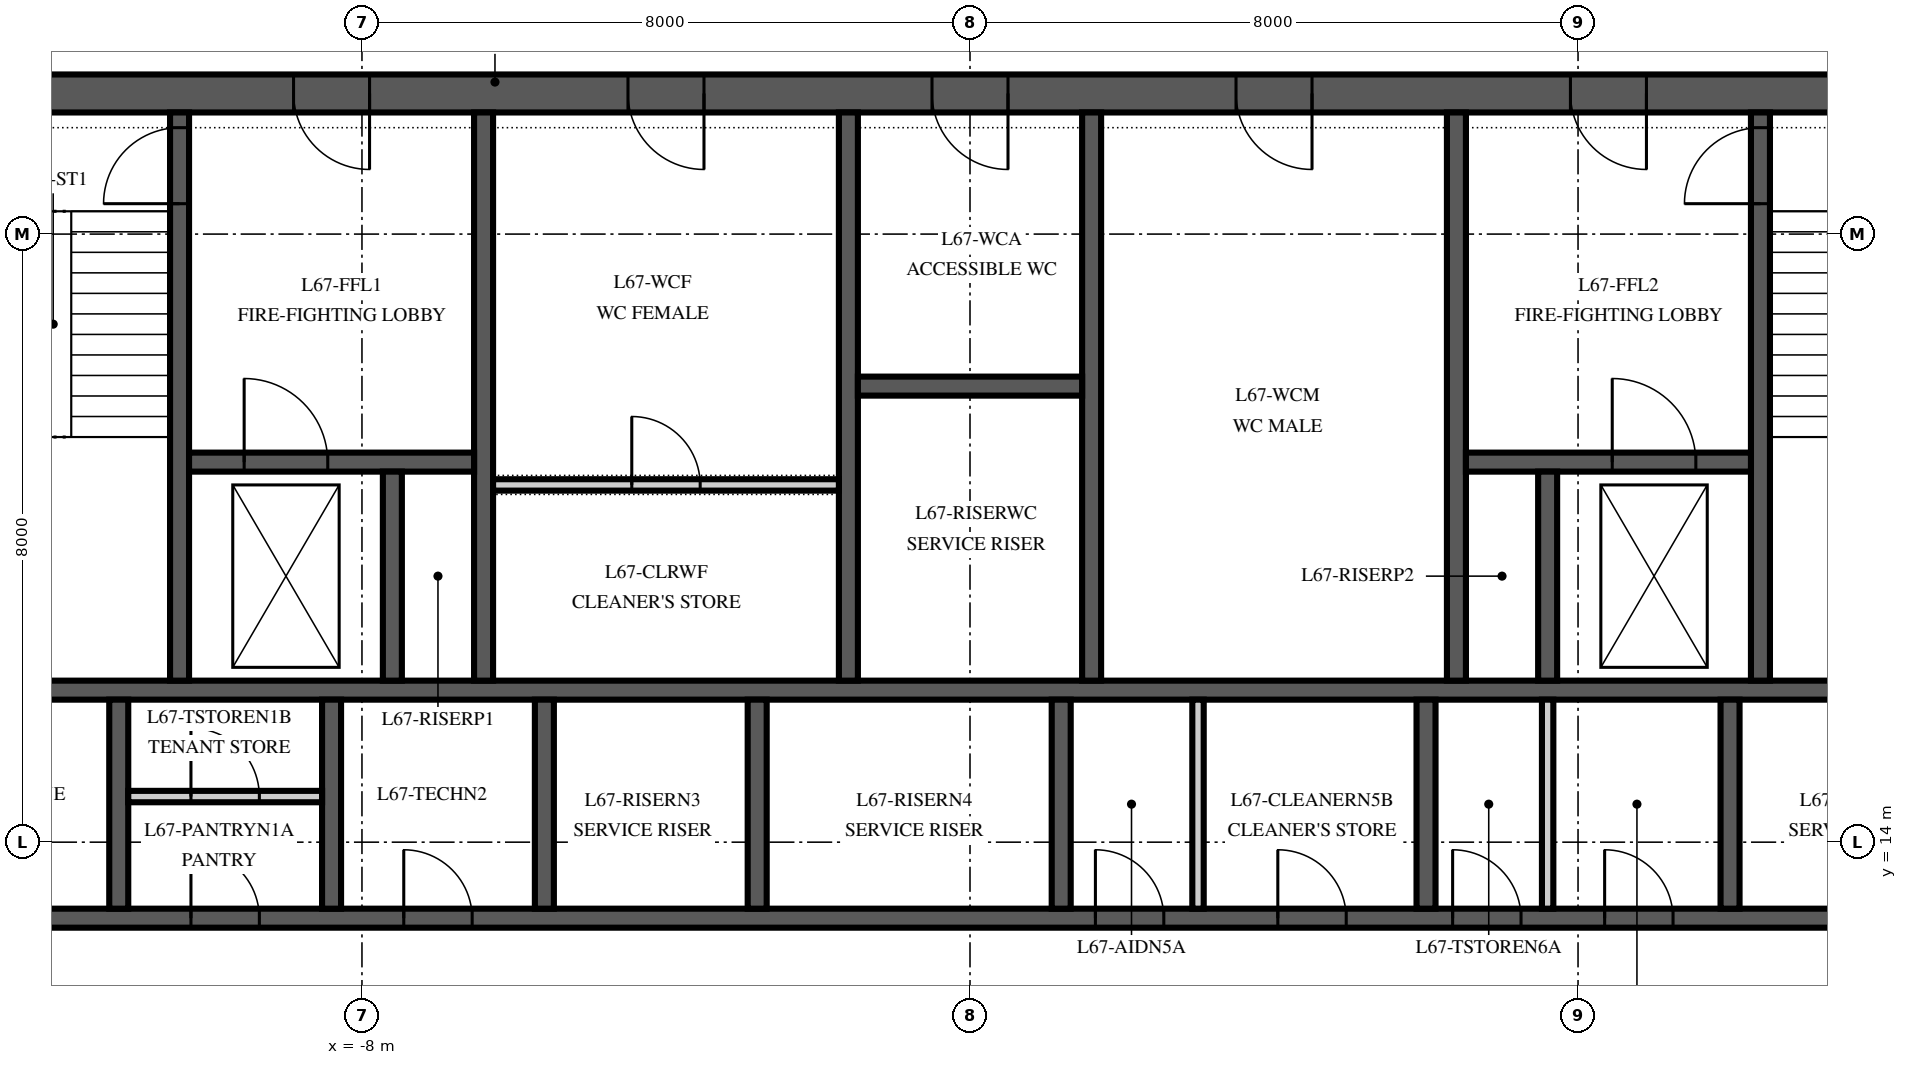
"""IFC4 building model, lengths in metres.
Left out: names, types, materials, properties, quantities, classifications, styles, units other than length and angle.
Written with IfcOpenShell. Run it as: python <this file> out.ifc"""

import sys

from ifc_helpers import new_model, si_unit, direction, frame, frame_2d, origin, place, context, subcontext, project, spatial, rectangle, extrude, element, fill, save


model = new_model("IFC4")
c1 = context("Model", 3, precision=1e-05, world=origin(), true_north=direction((0.0, 1.0)))
c2 = subcontext(c1, "Body", "Model", "MODEL_VIEW")
j1 = project(units=[si_unit("LENGTHUNIT", "METRE"), si_unit("PLANEANGLEUNIT", "RADIAN")], contexts=[c1])
p1 = place(None, origin())
s1 = spatial("IfcSite", under=j1, at=p1, CompositionType="ELEMENT")
p2 = place(p1, origin())
s2 = spatial("IfcBuilding", under=s1, at=p2, CompositionType="ELEMENT")
p3 = place(p2, frame((0.0, 0.0, 288.0)))
s3 = spatial("IfcBuildingStorey", under=s2, at=p3, CompositionType="ELEMENT", Elevation=288.0)
p4 = place(p3, frame((13.85, 23.85, 0.0), z_axis=(0.0, 0.0, 1.0), x_axis=(-1.0, 0.0, 0.0)))
e1 = element("IfcWall", 1, at=p4, inside=s3, PredefinedType="SHEAR", context=c2, shape_type="SweptSolid", body=[
    extrude(rectangle(XDim=27.7, YDim=0.5, at=frame_2d((13.85, 0.0))), origin(), (0.0, 0.0, 1.0), 4.0),
])
p5 = place(p4, frame((21.75, 0.0, 0.0)))
e2 = element("IfcOpeningElement", 2, at=p5, cuts=e1, PredefinedType="OPENING", context=c2, shape_type="SweptSolid", body=[
    extrude(rectangle(XDim=1.0, YDim=2.1, at=frame_2d((0.5, 1.05))), frame((0.0, 0.265, 0.0), z_axis=(0.0, -1.0, 0.0), x_axis=(1.0, 0.0, 0.0)), (0.0, 0.0, 1.0), 0.53),
])
p6 = place(p4, frame((4.95, 0.0, 0.0)))
e3 = element("IfcOpeningElement", 3, at=p6, cuts=e1, PredefinedType="OPENING", context=c2, shape_type="SweptSolid", body=[
    extrude(rectangle(XDim=1.0, YDim=2.1, at=frame_2d((0.5, 1.05))), frame((0.0, 0.265, 0.0), z_axis=(0.0, -1.0, 0.0), x_axis=(1.0, 0.0, 0.0)), (0.0, 0.0, 1.0), 0.53),
])
p7 = place(p4, frame((17.35, 0.0, 0.0)))
e4 = element("IfcOpeningElement", 4, at=p7, cuts=e1, PredefinedType="OPENING", context=c2, shape_type="SweptSolid", body=[
    extrude(rectangle(XDim=1.0, YDim=2.1, at=frame_2d((0.5, 1.05))), frame((0.0, 0.265, 0.0), z_axis=(0.0, -1.0, 0.0), x_axis=(1.0, 0.0, 0.0)), (0.0, 0.0, 1.0), 0.53),
])
p8 = place(p4, frame((13.35, 0.0, 0.0)))
e5 = element("IfcOpeningElement", 5, at=p8, cuts=e1, PredefinedType="OPENING", context=c2, shape_type="SweptSolid", body=[
    extrude(rectangle(XDim=1.0, YDim=2.1, at=frame_2d((0.5, 1.05))), frame((0.0, 0.265, 0.0), z_axis=(0.0, -1.0, 0.0), x_axis=(1.0, 0.0, 0.0)), (0.0, 0.0, 1.0), 0.53),
])
p9 = place(p4, frame((9.35, 0.0, 0.0)))
e6 = element("IfcOpeningElement", 6, at=p9, cuts=e1, PredefinedType="OPENING", context=c2, shape_type="SweptSolid", body=[
    extrude(rectangle(XDim=1.0, YDim=2.1, at=frame_2d((0.5, 1.05))), frame((0.0, 0.265, 0.0), z_axis=(0.0, -1.0, 0.0), x_axis=(1.0, 0.0, 0.0)), (0.0, 0.0, 1.0), 0.53),
])
p10 = place(p3, frame((-13.6, 13.0, 0.0), z_axis=(0.0, 0.0, 1.0), x_axis=(1.0, 0.0, 0.0)))
e7 = element("IfcWall", 7, at=p10, inside=s3, PredefinedType="SHEAR", context=c2, shape_type="SweptSolid", body=[
    extrude(rectangle(XDim=27.2, YDim=0.25, at=frame_2d((13.6, 0.0))), origin(), (0.0, 0.0, 1.0), 4.0),
])
p11 = place(p10, frame((15.25, 0.0, 0.0)))
e8 = element("IfcOpeningElement", 8, at=p11, cuts=e7, PredefinedType="OPENING", context=c2, shape_type="SweptSolid", body=[
    extrude(rectangle(XDim=0.9, YDim=2.1, at=frame_2d((0.45, 1.05))), frame((0.0, 0.14, 0.0), z_axis=(0.0, -1.0, 0.0), x_axis=(1.0, 0.0, 0.0)), (0.0, 0.0, 1.0), 0.28),
])
p12 = place(p10, frame((17.65, 0.0, 0.0)))
e9 = element("IfcOpeningElement", 9, at=p12, cuts=e7, PredefinedType="OPENING", context=c2, shape_type="SweptSolid", body=[
    extrude(rectangle(XDim=0.9, YDim=2.1, at=frame_2d((0.45, 1.05))), frame((0.0, 0.14, 0.0), z_axis=(0.0, -1.0, 0.0), x_axis=(1.0, 0.0, 0.0)), (0.0, 0.0, 1.0), 0.28),
])
p13 = place(p10, frame((19.95, 0.0, 0.0)))
e10 = element("IfcOpeningElement", 10, at=p13, cuts=e7, PredefinedType="OPENING", context=c2, shape_type="SweptSolid", body=[
    extrude(rectangle(XDim=0.9, YDim=2.1, at=frame_2d((0.45, 1.05))), frame((0.0, 0.14, 0.0), z_axis=(0.0, -1.0, 0.0), x_axis=(1.0, 0.0, 0.0)), (0.0, 0.0, 1.0), 0.28),
])
p14 = place(p10, frame((21.95, 0.0, 0.0)))
e11 = element("IfcOpeningElement", 11, at=p14, cuts=e7, PredefinedType="OPENING", context=c2, shape_type="SweptSolid", body=[
    extrude(rectangle(XDim=0.9, YDim=2.1, at=frame_2d((0.45, 1.05))), frame((0.0, 0.14, 0.0), z_axis=(0.0, -1.0, 0.0), x_axis=(1.0, 0.0, 0.0)), (0.0, 0.0, 1.0), 0.28),
])
p15 = place(p10, frame((0.55, 0.0, 0.0)))
e12 = element("IfcOpeningElement", 12, at=p15, cuts=e7, PredefinedType="OPENING", context=c2, shape_type="SweptSolid", body=[
    extrude(rectangle(XDim=0.9, YDim=2.1, at=frame_2d((0.45, 1.05))), frame((0.0, 0.14, 0.0), z_axis=(0.0, -1.0, 0.0), x_axis=(1.0, 0.0, 0.0)), (0.0, 0.0, 1.0), 0.28),
])
p16 = place(p10, frame((3.35, 0.0, 0.0)))
e13 = element("IfcOpeningElement", 13, at=p16, cuts=e7, PredefinedType="OPENING", context=c2, shape_type="SweptSolid", body=[
    extrude(rectangle(XDim=0.9, YDim=2.1, at=frame_2d((0.45, 1.05))), frame((0.0, 0.14, 0.0), z_axis=(0.0, -1.0, 0.0), x_axis=(1.0, 0.0, 0.0)), (0.0, 0.0, 1.0), 0.28),
])
p17 = place(p10, frame((6.15, 0.0, 0.0)))
e14 = element("IfcOpeningElement", 14, at=p17, cuts=e7, PredefinedType="OPENING", context=c2, shape_type="SweptSolid", body=[
    extrude(rectangle(XDim=0.9, YDim=2.1, at=frame_2d((0.45, 1.05))), frame((0.0, 0.14, 0.0), z_axis=(0.0, -1.0, 0.0), x_axis=(1.0, 0.0, 0.0)), (0.0, 0.0, 1.0), 0.28),
])
p18 = place(p3, frame((-13.6, 16.0, 0.0), z_axis=(0.0, 0.0, 1.0), x_axis=(1.0, 0.0, 0.0)))
e15 = element("IfcWall", 15, at=p18, inside=s3, PredefinedType="SHEAR", context=c2, shape_type="SweptSolid", body=[
    extrude(rectangle(XDim=27.2, YDim=0.25, at=frame_2d((13.6, 0.0))), origin(), (0.0, 0.0, 1.0), 4.0),
])
for number, where, z_axis, x_axis in (
    (16, (-11.2, 13.125, 0.0), (0.0, 0.0, 1.0), (0.0, 1.0, 0.0)),
    (17, (-8.4, 13.125, 0.0), (0.0, 0.0, 1.0), (0.0, 1.0, 0.0)),
    (18, (-5.6, 13.125, 0.0), (0.0, 0.0, 1.0), (0.0, 1.0, 0.0)),
    (19, (-2.8, 13.125, 0.0), (0.0, 0.0, 1.0), (0.0, 1.0, 0.0)),
    (20, (1.2, 13.125, 0.0), (0.0, 0.0, 1.0), (0.0, 1.0, 0.0)),
    (21, (6.0, 13.125, 0.0), (0.0, 0.0, 1.0), (0.0, 1.0, 0.0)),
    (22, (10.0, 13.125, 0.0), (0.0, 0.0, 1.0), (0.0, 1.0, 0.0)),
):
    element("IfcWall", number, at=place(p3, frame(where, z_axis=z_axis, x_axis=x_axis)), inside=s3, PredefinedType="SHEAR", context=c2, shape_type="SweptSolid", body=[
        extrude(rectangle(XDim=2.75, YDim=0.25, at=frame_2d((1.375, 0.0))), origin(), (0.0, 0.0, 1.0), 4.0),
    ])
p19 = place(p3, frame((-10.4, 16.125, 0.0), z_axis=(0.0, 0.0, 1.0), x_axis=(0.0, 1.0, 0.0)))
e23 = element("IfcWall", 23, at=p19, inside=s3, PredefinedType="SHEAR", context=c2, shape_type="SweptSolid", body=[
    extrude(rectangle(XDim=7.475, YDim=0.25, at=frame_2d((3.738, 0.0))), origin(), (0.0, 0.0, 1.0), 4.0),
])
p20 = place(p19, frame((6.275, 0.0, 0.0)))
e24 = element("IfcOpeningElement", 24, at=p20, cuts=e23, PredefinedType="OPENING", context=c2, shape_type="SweptSolid", body=[
    extrude(rectangle(XDim=1.0, YDim=2.1, at=frame_2d((0.5, 1.05))), frame((0.0, 0.14, 0.0), z_axis=(0.0, -1.0, 0.0), x_axis=(1.0, 0.0, 0.0)), (0.0, 0.0, 1.0), 0.28),
])
for number, where, z_axis, x_axis in (
    (25, (-6.4, 16.125, 0.0), (0.0, 0.0, 1.0), (0.0, 1.0, 0.0)),
    (26, (-1.6, 16.125, 0.0), (0.0, 0.0, 1.0), (0.0, 1.0, 0.0)),
    (27, (1.6, 16.125, 0.0), (0.0, 0.0, 1.0), (0.0, 1.0, 0.0)),
    (28, (6.4, 16.125, 0.0), (0.0, 0.0, 1.0), (0.0, 1.0, 0.0)),
):
    element("IfcWall", number, at=place(p3, frame(where, z_axis=z_axis, x_axis=x_axis)), inside=s3, PredefinedType="SHEAR", context=c2, shape_type="SweptSolid", body=[
        extrude(rectangle(XDim=7.475, YDim=0.25, at=frame_2d((3.738, 0.0))), origin(), (0.0, 0.0, 1.0), 4.0),
    ])
p21 = place(p3, frame((10.4, 16.125, 0.0), z_axis=(0.0, 0.0, 1.0), x_axis=(0.0, 1.0, 0.0)))
e29 = element("IfcWall", 29, at=p21, inside=s3, PredefinedType="SHEAR", context=c2, shape_type="SweptSolid", body=[
    extrude(rectangle(XDim=7.475, YDim=0.25, at=frame_2d((3.738, 0.0))), origin(), (0.0, 0.0, 1.0), 4.0),
])
p22 = place(p21, frame((6.275, 0.0, 0.0)))
e30 = element("IfcOpeningElement", 30, at=p22, cuts=e29, PredefinedType="OPENING", context=c2, shape_type="SweptSolid", body=[
    extrude(rectangle(XDim=1.0, YDim=2.1, at=frame_2d((0.5, 1.05))), frame((0.0, 0.14, 0.0), z_axis=(0.0, -1.0, 0.0), x_axis=(1.0, 0.0, 0.0)), (0.0, 0.0, 1.0), 0.28),
])
p23 = place(p3, frame((-10.275, 19.0, 0.0), z_axis=(0.0, 0.0, 1.0), x_axis=(1.0, 0.0, 0.0)))
e31 = element("IfcWall", 31, at=p23, inside=s3, PredefinedType="SHEAR", context=c2, shape_type="SweptSolid", body=[
    extrude(rectangle(XDim=3.75, YDim=0.25, at=frame_2d((1.875, 0.0))), origin(), (0.0, 0.0, 1.0), 4.0),
])
p24 = place(p23, frame((0.725, 0.0, 0.0)))
e32 = element("IfcOpeningElement", 32, at=p24, cuts=e31, PredefinedType="OPENING", context=c2, shape_type="SweptSolid", body=[
    extrude(rectangle(XDim=1.1, YDim=2.1, at=frame_2d((0.55, 1.05))), frame((0.0, 0.14, 0.0), z_axis=(0.0, -1.0, 0.0), x_axis=(1.0, 0.0, 0.0)), (0.0, 0.0, 1.0), 0.28),
])
p25 = place(p3, frame((6.525, 19.0, 0.0), z_axis=(0.0, 0.0, 1.0), x_axis=(1.0, 0.0, 0.0)))
e33 = element("IfcWall", 33, at=p25, inside=s3, PredefinedType="SHEAR", context=c2, shape_type="SweptSolid", body=[
    extrude(rectangle(XDim=3.75, YDim=0.25, at=frame_2d((1.875, 0.0))), origin(), (0.0, 0.0, 1.0), 4.0),
])
p26 = place(p25, frame((1.925, 0.0, 0.0)))
e34 = element("IfcOpeningElement", 34, at=p26, cuts=e33, PredefinedType="OPENING", context=c2, shape_type="SweptSolid", body=[
    extrude(rectangle(XDim=1.1, YDim=2.1, at=frame_2d((0.55, 1.05))), frame((0.0, 0.14, 0.0), z_axis=(0.0, -1.0, 0.0), x_axis=(1.0, 0.0, 0.0)), (0.0, 0.0, 1.0), 0.28),
])
for number, where, z_axis, x_axis in (
    (35, (-7.6, 16.125, 0.0), (0.0, 0.0, 1.0), (0.0, 1.0, 0.0)),
    (36, (7.6, 16.125, 0.0), (0.0, 0.0, 1.0), (0.0, 1.0, 0.0)),
):
    element("IfcWall", number, at=place(p3, frame(where, z_axis=z_axis, x_axis=x_axis)), inside=s3, PredefinedType="SHEAR", context=c2, shape_type="SweptSolid", body=[
        extrude(rectangle(XDim=2.75, YDim=0.25, at=frame_2d((1.375, 0.0))), origin(), (0.0, 0.0, 1.0), 4.0),
    ])
p27 = place(p3, frame((-1.475, 20.0, 0.0), z_axis=(0.0, 0.0, 1.0), x_axis=(1.0, 0.0, 0.0)))
e37 = element("IfcWall", 37, at=p27, inside=s3, PredefinedType="SHEAR", context=c2, shape_type="SweptSolid", body=[
    extrude(rectangle(XDim=2.95, YDim=0.25, at=frame_2d((1.475, 0.0))), origin(), (0.0, 0.0, 1.0), 4.0),
])
p28 = place(p3, frame((-6.275, 18.7, 0.0), z_axis=(0.0, 0.0, 1.0), x_axis=(1.0, 0.0, 0.0)))
e38 = element("IfcWall", 38, at=p28, inside=s3, PredefinedType="PARTITIONING", context=c2, shape_type="SweptSolid", body=[
    extrude(rectangle(XDim=4.55, YDim=0.15, at=frame_2d((2.275, 0.0))), origin(), (0.0, 0.0, 1.0), 3.85),
])
p29 = place(p28, frame((1.825, 0.0, 0.0)))
e39 = element("IfcOpeningElement", 39, at=p29, cuts=e38, PredefinedType="OPENING", context=c2, shape_type="SweptSolid", body=[
    extrude(rectangle(XDim=0.9, YDim=2.1, at=frame_2d((0.45, 1.05))), frame((0.0, 0.09, 0.0), z_axis=(0.0, -1.0, 0.0), x_axis=(1.0, 0.0, 0.0)), (0.0, 0.0, 1.0), 0.18),
])
for number, where, z_axis, x_axis in (
    (40, (3.0, 13.125, 0.0), (0.0, 0.0, 1.0), (0.0, 1.0, 0.0)),
    (41, (7.6, 13.125, 0.0), (0.0, 0.0, 1.0), (0.0, 1.0, 0.0)),
):
    element("IfcWall", number, at=place(p3, frame(where, z_axis=z_axis, x_axis=x_axis)), inside=s3, PredefinedType="PARTITIONING", context=c2, shape_type="SweptSolid", body=[
        extrude(rectangle(XDim=2.75, YDim=0.15, at=frame_2d((1.375, 0.0))), origin(), (0.0, 0.0, 1.0), 3.85),
    ])
p30 = place(p3, frame((-11.075, 14.6, 0.0), z_axis=(0.0, 0.0, 1.0), x_axis=(1.0, 0.0, 0.0)))
e42 = element("IfcWall", 42, at=p30, inside=s3, PredefinedType="PARTITIONING", context=c2, shape_type="SweptSolid", body=[
    extrude(rectangle(XDim=2.55, YDim=0.15, at=frame_2d((1.275, 0.0))), origin(), (0.0, 0.0, 1.0), 3.85),
])
p31 = place(p30, frame((0.825, 0.0, 0.0)))
e43 = element("IfcOpeningElement", 43, at=p31, cuts=e42, PredefinedType="OPENING", context=c2, shape_type="SweptSolid", body=[
    extrude(rectangle(XDim=0.9, YDim=2.1, at=frame_2d((0.45, 1.05))), frame((0.0, 0.09, 0.0), z_axis=(0.0, -1.0, 0.0), x_axis=(1.0, 0.0, 0.0)), (0.0, 0.0, 1.0), 0.18),
])
p32 = place(p5, origin())
e44 = element("IfcDoor", 44, at=p32, inside=s3, OperationType="SINGLE_SWING_RIGHT", PredefinedType="DOOR", context=c2, shape_type="SweptSolid", body=[
    extrude(rectangle(XDim=1.0, YDim=2.1, at=frame_2d((0.5, 1.05))), frame((0.0, 0.25, 0.0), z_axis=(0.0, -1.0, 0.0), x_axis=(1.0, 0.0, 0.0)), (0.0, 0.0, 1.0), 0.5),
])
fill(e2, e44)
p33 = place(p6, origin())
e45 = element("IfcDoor", 45, at=p33, inside=s3, OperationType="SINGLE_SWING_RIGHT", PredefinedType="DOOR", context=c2, shape_type="SweptSolid", body=[
    extrude(rectangle(XDim=1.0, YDim=2.1, at=frame_2d((0.5, 1.05))), frame((0.0, 0.25, 0.0), z_axis=(0.0, -1.0, 0.0), x_axis=(1.0, 0.0, 0.0)), (0.0, 0.0, 1.0), 0.5),
])
fill(e3, e45)
p34 = place(p7, origin())
e46 = element("IfcDoor", 46, at=p34, inside=s3, OperationType="SINGLE_SWING_LEFT", PredefinedType="DOOR", context=c2, shape_type="SweptSolid", body=[
    extrude(rectangle(XDim=1.0, YDim=2.1, at=frame_2d((0.5, 1.05))), frame((0.0, 0.25, 0.0), z_axis=(0.0, -1.0, 0.0), x_axis=(1.0, 0.0, 0.0)), (0.0, 0.0, 1.0), 0.5),
])
fill(e4, e46)
p35 = place(p8, origin())
e47 = element("IfcDoor", 47, at=p35, inside=s3, OperationType="SINGLE_SWING_LEFT", PredefinedType="DOOR", context=c2, shape_type="SweptSolid", body=[
    extrude(rectangle(XDim=1.0, YDim=2.1, at=frame_2d((0.5, 1.05))), frame((0.0, 0.25, 0.0), z_axis=(0.0, -1.0, 0.0), x_axis=(1.0, 0.0, 0.0)), (0.0, 0.0, 1.0), 0.5),
])
fill(e5, e47)
p36 = place(p9, origin())
e48 = element("IfcDoor", 48, at=p36, inside=s3, OperationType="SINGLE_SWING_LEFT", PredefinedType="DOOR", context=c2, shape_type="SweptSolid", body=[
    extrude(rectangle(XDim=1.0, YDim=2.1, at=frame_2d((0.5, 1.05))), frame((0.0, 0.25, 0.0), z_axis=(0.0, -1.0, 0.0), x_axis=(1.0, 0.0, 0.0)), (0.0, 0.0, 1.0), 0.5),
])
fill(e6, e48)
p37 = place(p20, origin())
e49 = element("IfcDoor", 49, at=p37, inside=s3, OperationType="SINGLE_SWING_LEFT", PredefinedType="DOOR", context=c2, shape_type="SweptSolid", body=[
    extrude(rectangle(XDim=1.0, YDim=2.1, at=frame_2d((0.5, 1.05))), frame((0.0, 0.125, 0.0), z_axis=(0.0, -1.0, 0.0), x_axis=(1.0, 0.0, 0.0)), (0.0, 0.0, 1.0), 0.25),
])
fill(e24, e49)
p38 = place(p22, origin())
e50 = element("IfcDoor", 50, at=p38, inside=s3, OperationType="SINGLE_SWING_LEFT", PredefinedType="DOOR", context=c2, shape_type="SweptSolid", body=[
    extrude(rectangle(XDim=1.0, YDim=2.1, at=frame_2d((0.5, 1.05))), frame((0.0, 0.125, 0.0), z_axis=(0.0, -1.0, 0.0), x_axis=(1.0, 0.0, 0.0)), (0.0, 0.0, 1.0), 0.25),
])
fill(e30, e50)
p39 = place(p26, origin())
e51 = element("IfcDoor", 51, at=p39, inside=s3, OperationType="SLIDING_TO_RIGHT", PredefinedType="DOOR", context=c2, shape_type="SweptSolid", body=[
    extrude(rectangle(XDim=1.1, YDim=2.1, at=frame_2d((0.55, 1.05))), frame((0.0, 0.125, 0.0), z_axis=(0.0, -1.0, 0.0), x_axis=(1.0, 0.0, 0.0)), (0.0, 0.0, 1.0), 0.25),
])
fill(e34, e51)
p40 = place(p24, origin())
e52 = element("IfcDoor", 52, at=p40, inside=s3, OperationType="SLIDING_TO_RIGHT", PredefinedType="DOOR", context=c2, shape_type="SweptSolid", body=[
    extrude(rectangle(XDim=1.1, YDim=2.1, at=frame_2d((0.55, 1.05))), frame((0.0, 0.125, 0.0), z_axis=(0.0, -1.0, 0.0), x_axis=(1.0, 0.0, 0.0)), (0.0, 0.0, 1.0), 0.25),
])
fill(e32, e52)
p41 = place(p11, origin())
e53 = element("IfcDoor", 53, at=p41, inside=s3, OperationType="SINGLE_SWING_LEFT", PredefinedType="DOOR", context=c2, shape_type="SweptSolid", body=[
    extrude(rectangle(XDim=0.9, YDim=2.1, at=frame_2d((0.45, 1.05))), frame((0.0, 0.125, 0.0), z_axis=(0.0, -1.0, 0.0), x_axis=(1.0, 0.0, 0.0)), (0.0, 0.0, 1.0), 0.25),
])
fill(e8, e53)
p42 = place(p12, origin())
e54 = element("IfcDoor", 54, at=p42, inside=s3, OperationType="SINGLE_SWING_LEFT", PredefinedType="DOOR", context=c2, shape_type="SweptSolid", body=[
    extrude(rectangle(XDim=0.9, YDim=2.1, at=frame_2d((0.45, 1.05))), frame((0.0, 0.125, 0.0), z_axis=(0.0, -1.0, 0.0), x_axis=(1.0, 0.0, 0.0)), (0.0, 0.0, 1.0), 0.25),
])
fill(e9, e54)
p43 = place(p13, origin())
e55 = element("IfcDoor", 55, at=p43, inside=s3, OperationType="SINGLE_SWING_LEFT", PredefinedType="DOOR", context=c2, shape_type="SweptSolid", body=[
    extrude(rectangle(XDim=0.9, YDim=2.1, at=frame_2d((0.45, 1.05))), frame((0.0, 0.125, 0.0), z_axis=(0.0, -1.0, 0.0), x_axis=(1.0, 0.0, 0.0)), (0.0, 0.0, 1.0), 0.25),
])
fill(e10, e55)
p44 = place(p14, origin())
e56 = element("IfcDoor", 56, at=p44, inside=s3, OperationType="SINGLE_SWING_LEFT", PredefinedType="DOOR", context=c2, shape_type="SweptSolid", body=[
    extrude(rectangle(XDim=0.9, YDim=2.1, at=frame_2d((0.45, 1.05))), frame((0.0, 0.125, 0.0), z_axis=(0.0, -1.0, 0.0), x_axis=(1.0, 0.0, 0.0)), (0.0, 0.0, 1.0), 0.25),
])
fill(e11, e56)
p45 = place(p16, origin())
e57 = element("IfcDoor", 57, at=p45, inside=s3, OperationType="SINGLE_SWING_LEFT", PredefinedType="DOOR", context=c2, shape_type="SweptSolid", body=[
    extrude(rectangle(XDim=0.9, YDim=2.1, at=frame_2d((0.45, 1.05))), frame((0.0, 0.125, 0.0), z_axis=(0.0, -1.0, 0.0), x_axis=(1.0, 0.0, 0.0)), (0.0, 0.0, 1.0), 0.25),
])
fill(e13, e57)
p46 = place(p31, origin())
e58 = element("IfcDoor", 58, at=p46, inside=s3, OperationType="SINGLE_SWING_LEFT", PredefinedType="DOOR", context=c2, shape_type="SweptSolid", body=[
    extrude(rectangle(XDim=0.9, YDim=2.1, at=frame_2d((0.45, 1.05))), frame((0.0, 0.075, 0.0), z_axis=(0.0, -1.0, 0.0), x_axis=(1.0, 0.0, 0.0)), (0.0, 0.0, 1.0), 0.149),
])
fill(e43, e58)
p47 = place(p17, origin())
e59 = element("IfcDoor", 59, at=p47, inside=s3, OperationType="SINGLE_SWING_LEFT", PredefinedType="DOOR", context=c2, shape_type="SweptSolid", body=[
    extrude(rectangle(XDim=0.9, YDim=2.1, at=frame_2d((0.45, 1.05))), frame((0.0, 0.125, 0.0), z_axis=(0.0, -1.0, 0.0), x_axis=(1.0, 0.0, 0.0)), (0.0, 0.0, 1.0), 0.25),
])
fill(e14, e59)
p48 = place(p29, origin())
e60 = element("IfcDoor", 60, at=p48, inside=s3, OperationType="SINGLE_SWING_LEFT", PredefinedType="DOOR", context=c2, shape_type="SweptSolid", body=[
    extrude(rectangle(XDim=0.9, YDim=2.1, at=frame_2d((0.45, 1.05))), frame((0.0, 0.075, 0.0), z_axis=(0.0, -1.0, 0.0), x_axis=(1.0, 0.0, 0.0)), (0.0, 0.0, 1.0), 0.149),
])
fill(e39, e60)
save(model, sys.argv[1])
